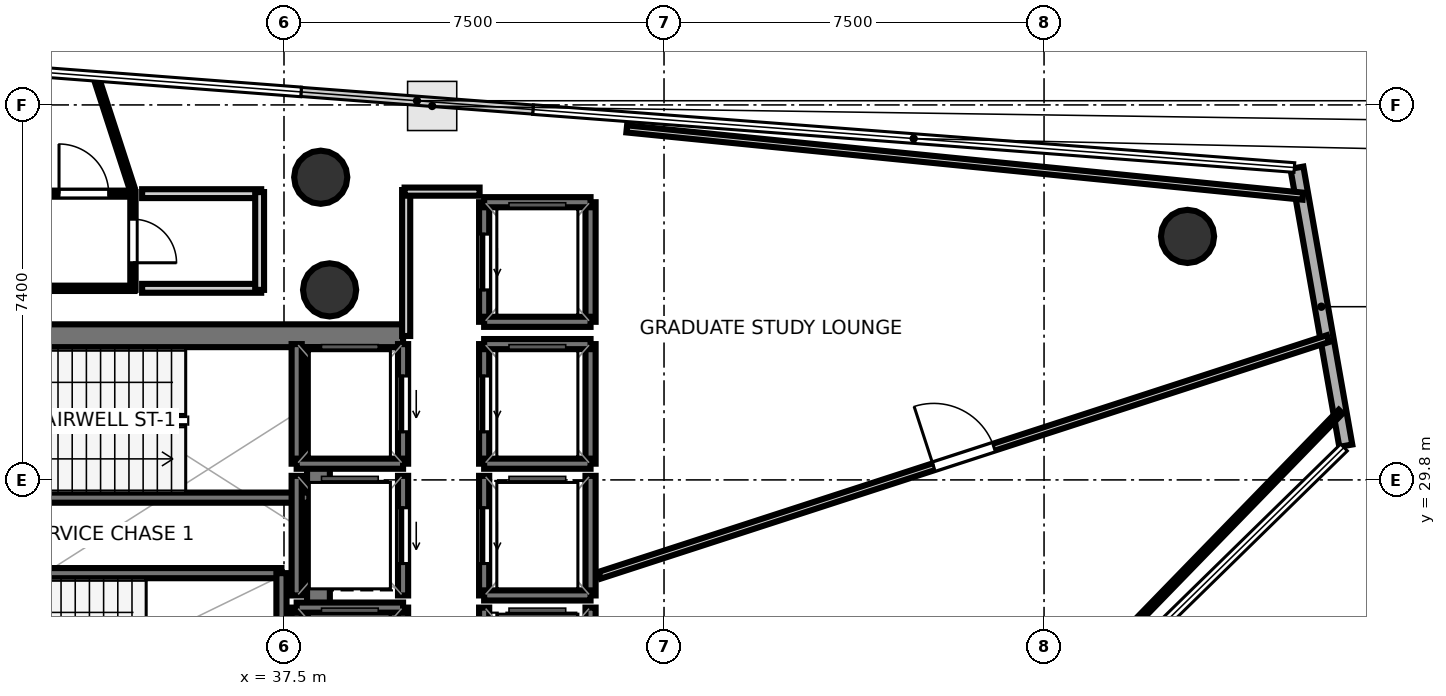
"""IFC4 building model, lengths in metres.
Left out: names, types, materials, properties, quantities, classifications, styles, units other than length and angle.
Written with IfcOpenShell. Run it as: python <this file> out.ifc"""

import sys

from ifc_helpers import new_model, si_unit, direction, frame, frame_2d, origin, origin_2d, place, context, subcontext, project, spatial, rectangle, hollow_circle, extrude, element, fill, save


model = new_model("IFC4")
c1 = context("Model", 3, precision=1e-05, world=origin(), true_north=direction((0.0, 1.0)))
c2 = subcontext(c1, "Body", "Model", "MODEL_VIEW")
j1 = project(units=[si_unit("LENGTHUNIT", "METRE"), si_unit("PLANEANGLEUNIT", "RADIAN")], contexts=[c1])
p1 = place(None, origin())
s1 = spatial("IfcSite", under=j1, at=p1, CompositionType="ELEMENT")
p2 = place(p1, origin())
s2 = spatial("IfcBuilding", under=s1, at=p2, CompositionType="ELEMENT")
p3 = place(p2, frame((0.0, 0.0, 234.5)))
s3 = spatial("IfcBuildingStorey", under=s2, at=p3, CompositionType="ELEMENT", Elevation=234.5)
p4 = place(p3, frame((29.33, 32.645, 0.0), z_axis=(0.0, 0.0, 1.0), x_axis=(1.0, 0.0, 0.0)))
e1 = element("IfcWall", 1, at=p4, inside=s3, PredefinedType="SHEAR", context=c2, shape_type="SweptSolid", body=[
    extrude(rectangle(XDim=10.52, YDim=0.45, at=frame_2d((5.26, 0.0))), origin(), (0.0, 0.0, 1.0), 4.32),
])
p5 = place(p4, frame((0.895, 0.0, 0.0)))
e2 = element("IfcOpeningElement", 2, at=p5, cuts=e1, PredefinedType="OPENING", context=c2, shape_type="SweptSolid", body=[
    extrude(rectangle(XDim=1.25, YDim=2.15, at=frame_2d((0.625, 1.075))), frame((0.0, 0.235, 0.0), z_axis=(0.0, -1.0, 0.0), x_axis=(1.0, 0.0, 0.0)), (0.0, 0.0, 1.0), 0.47),
])
p6 = place(p3, frame((38.18, 24.98, 0.0), z_axis=(0.0, 0.0, 1.0), x_axis=(0.0, 1.0, 0.0)))
e3 = element("IfcWall", 3, at=p6, inside=s3, PredefinedType="SHEAR", context=c2, shape_type="SweptSolid", body=[
    extrude(rectangle(XDim=7.44, YDim=0.45, at=frame_2d((3.72, 0.0))), origin(), (0.0, 0.0, 1.0), 4.32),
])
p7 = place(p3, frame((38.4, 33.55, 0.0), z_axis=(0.0, 0.0, 1.0), x_axis=(1.0, 0.0, 0.0)))
e4 = element("IfcColumn", 4, at=p7, inside=s3, PredefinedType="COLUMN", context=c2, shape_type="SweptSolid", body=[
    extrude(hollow_circle(Radius=0.525, WallThickness=0.028, at=origin_2d()), origin(), (0.0, 0.0, 1.0), 4.5),
])
for number, where, z_axis, x_axis in (
    (5, (55.332, 34.605, -0.27), (0.0, 0.0, 1.0), (1.0, 0.0, 0.0)),
    (6, (38.225, 35.773, -0.27), (0.0, 0.0, 1.0), (1.0, 0.0, 0.0)),
):
    element("IfcColumn", number, at=place(p3, frame(where, z_axis=z_axis, x_axis=x_axis)), inside=s3, PredefinedType="COLUMN", context=c2, shape_type="SweptSolid", body=[
        extrude(hollow_circle(Radius=0.525, WallThickness=0.028, at=origin_2d()), origin(), (0.0, 0.0, 1.0), 4.77),
    ])
p8 = place(p3, frame((58.455, 30.475, 0.0), z_axis=(0.0, 0.0, 1.0), x_axis=(-0.173235165229, 0.984880488957, 0.0)))
e7 = element("IfcWall", 7, at=p8, inside=s3, PredefinedType="SOLIDWALL", context=c2, shape_type="SweptSolid", body=[
    extrude(rectangle(XDim=5.57, YDim=0.26, at=frame_2d((2.785, 0.0))), origin(), (0.0, 0.0, 1.0), 4.32),
])
p9 = place(p3, frame((29.7, 29.45, 0.0), z_axis=(0.0, 0.0, 1.0), x_axis=(1.0, 0.0, 0.0)))
e8 = element("IfcWall", 8, at=p9, inside=s3, PredefinedType="SOLIDWALL", context=c2, shape_type="SweptSolid", body=[
    extrude(rectangle(XDim=8.3, YDim=0.2, at=frame_2d((4.15, 0.0))), origin(), (0.0, 0.0, 1.0), 4.32),
])
p10 = place(p3, frame((29.7, 27.96, 0.0), z_axis=(0.0, 0.0, 1.0), x_axis=(1.0, 0.0, 0.0)))
e9 = element("IfcWall", 9, at=p10, inside=s3, PredefinedType="SOLIDWALL", context=c2, shape_type="SweptSolid", body=[
    extrude(rectangle(XDim=7.75, YDim=0.2, at=frame_2d((3.875, 0.0))), origin(), (0.0, 0.0, 1.0), 4.32),
])
p11 = place(p3, frame((37.45, 24.9, 0.0), z_axis=(0.0, 0.0, 1.0), x_axis=(0.0, 1.0, 0.0)))
e10 = element("IfcWall", 10, at=p11, inside=s3, PredefinedType="SOLIDWALL", context=c2, shape_type="SweptSolid", body=[
    extrude(rectangle(XDim=3.06, YDim=0.2, at=frame_2d((1.53, 0.0))), origin(), (0.0, 0.0, 1.0), 4.32),
])
p12 = place(p3, frame((39.85, 30.12, 0.0), z_axis=(0.0, 0.0, 1.0), x_axis=(0.0, 1.0, 0.0)))
e11 = element("IfcWall", 11, at=p12, inside=s3, PredefinedType="SOLIDWALL", context=c2, shape_type="SweptSolid", body=[
    extrude(rectangle(XDim=2.36, YDim=0.2, at=frame_2d((1.18, 0.0))), origin(), (0.0, 0.0, 1.0), 4.32),
])
p13 = place(p12, frame((0.63, 0.0, 0.0)))
e12 = element("IfcOpeningElement", 12, at=p13, cuts=e11, PredefinedType="OPENING", context=c2, shape_type="SweptSolid", body=[
    extrude(rectangle(XDim=1.1, YDim=2.15, at=frame_2d((0.55, 1.075))), frame((0.0, 0.11, 0.0), z_axis=(0.0, -1.0, 0.0), x_axis=(1.0, 0.0, 0.0)), (0.0, 0.0, 1.0), 0.22),
])
p14 = place(p3, frame((37.75, 30.12, 0.0), z_axis=(0.0, 0.0, 1.0), x_axis=(0.0, 1.0, 0.0)))
e13 = element("IfcWall", 13, at=p14, inside=s3, PredefinedType="SOLIDWALL", context=c2, shape_type="SweptSolid", body=[
    extrude(rectangle(XDim=2.36, YDim=0.2, at=frame_2d((1.18, 0.0))), origin(), (0.0, 0.0, 1.0), 4.32),
])
p15 = place(p3, frame((37.75, 30.12, 0.0), z_axis=(0.0, 0.0, 1.0), x_axis=(1.0, 0.0, 0.0)))
e14 = element("IfcWall", 14, at=p15, inside=s3, PredefinedType="SOLIDWALL", context=c2, shape_type="SweptSolid", body=[
    extrude(rectangle(XDim=2.1, YDim=0.2, at=frame_2d((1.05, 0.0))), origin(), (0.0, 0.0, 1.0), 4.32),
])
p16 = place(p3, frame((39.85, 24.92, 0.0), z_axis=(0.0, 0.0, 1.0), x_axis=(0.0, 1.0, 0.0)))
e15 = element("IfcWall", 15, at=p16, inside=s3, PredefinedType="SOLIDWALL", context=c2, shape_type="SweptSolid", body=[
    extrude(rectangle(XDim=2.36, YDim=0.2, at=frame_2d((1.18, 0.0))), origin(), (0.0, 0.0, 1.0), 4.32),
])
p17 = place(p16, frame((0.63, 0.0, 0.0)))
e16 = element("IfcOpeningElement", 16, at=p17, cuts=e15, PredefinedType="OPENING", context=c2, shape_type="SweptSolid", body=[
    extrude(rectangle(XDim=1.1, YDim=2.15, at=frame_2d((0.55, 1.075))), frame((0.0, 0.11, 0.0), z_axis=(0.0, -1.0, 0.0), x_axis=(1.0, 0.0, 0.0)), (0.0, 0.0, 1.0), 0.22),
])
p18 = place(p3, frame((37.75, 24.92, 0.0), z_axis=(0.0, 0.0, 1.0), x_axis=(0.0, 1.0, 0.0)))
e17 = element("IfcWall", 17, at=p18, inside=s3, PredefinedType="SOLIDWALL", context=c2, shape_type="SweptSolid", body=[
    extrude(rectangle(XDim=2.36, YDim=0.2, at=frame_2d((1.18, 0.0))), origin(), (0.0, 0.0, 1.0), 4.32),
])
p19 = place(p3, frame((37.75, 27.28, 0.0), z_axis=(0.0, 0.0, 1.0), x_axis=(1.0, 0.0, 0.0)))
e18 = element("IfcWall", 18, at=p19, inside=s3, PredefinedType="SOLIDWALL", context=c2, shape_type="SweptSolid", body=[
    extrude(rectangle(XDim=2.1, YDim=0.2, at=frame_2d((1.05, 0.0))), origin(), (0.0, 0.0, 1.0), 4.32),
])
p20 = place(p3, frame((43.55, 30.12, 0.0), z_axis=(0.0, 0.0, 1.0), x_axis=(0.0, 1.0, 0.0)))
e19 = element("IfcWall", 19, at=p20, inside=s3, PredefinedType="SOLIDWALL", context=c2, shape_type="SweptSolid", body=[
    extrude(rectangle(XDim=2.36, YDim=0.2, at=frame_2d((1.18, 0.0))), origin(), (0.0, 0.0, 1.0), 4.32),
])
p21 = place(p3, frame((41.45, 30.12, 0.0), z_axis=(0.0, 0.0, 1.0), x_axis=(0.0, 1.0, 0.0)))
e20 = element("IfcWall", 20, at=p21, inside=s3, PredefinedType="SOLIDWALL", context=c2, shape_type="SweptSolid", body=[
    extrude(rectangle(XDim=2.36, YDim=0.2, at=frame_2d((1.18, 0.0))), origin(), (0.0, 0.0, 1.0), 4.32),
])
p22 = place(p21, frame((0.63, 0.0, 0.0)))
e21 = element("IfcOpeningElement", 21, at=p22, cuts=e20, PredefinedType="OPENING", context=c2, shape_type="SweptSolid", body=[
    extrude(rectangle(XDim=1.1, YDim=2.15, at=frame_2d((0.55, 1.075))), frame((0.0, 0.11, 0.0), z_axis=(0.0, -1.0, 0.0), x_axis=(1.0, 0.0, 0.0)), (0.0, 0.0, 1.0), 0.22),
])
for number, where, z_axis, x_axis in (
    (22, (41.45, 32.48, 0.0), (0.0, 0.0, 1.0), (1.0, 0.0, 0.0)),
    (23, (41.45, 30.12, 0.0), (0.0, 0.0, 1.0), (1.0, 0.0, 0.0)),
):
    element("IfcWall", number, at=place(p3, frame(where, z_axis=z_axis, x_axis=x_axis)), inside=s3, PredefinedType="SOLIDWALL", context=c2, shape_type="SweptSolid", body=[
        extrude(rectangle(XDim=2.1, YDim=0.2, at=frame_2d((1.05, 0.0))), origin(), (0.0, 0.0, 1.0), 4.32),
    ])
p23 = place(p3, frame((43.55, 27.52, 0.0), z_axis=(0.0, 0.0, 1.0), x_axis=(0.0, 1.0, 0.0)))
e24 = element("IfcWall", 24, at=p23, inside=s3, PredefinedType="SOLIDWALL", context=c2, shape_type="SweptSolid", body=[
    extrude(rectangle(XDim=2.36, YDim=0.2, at=frame_2d((1.18, 0.0))), origin(), (0.0, 0.0, 1.0), 4.32),
])
p24 = place(p3, frame((41.45, 27.52, 0.0), z_axis=(0.0, 0.0, 1.0), x_axis=(0.0, 1.0, 0.0)))
e25 = element("IfcWall", 25, at=p24, inside=s3, PredefinedType="SOLIDWALL", context=c2, shape_type="SweptSolid", body=[
    extrude(rectangle(XDim=2.36, YDim=0.2, at=frame_2d((1.18, 0.0))), origin(), (0.0, 0.0, 1.0), 4.32),
])
p25 = place(p24, frame((0.63, 0.0, 0.0)))
e26 = element("IfcOpeningElement", 26, at=p25, cuts=e25, PredefinedType="OPENING", context=c2, shape_type="SweptSolid", body=[
    extrude(rectangle(XDim=1.1, YDim=2.15, at=frame_2d((0.55, 1.075))), frame((0.0, 0.11, 0.0), z_axis=(0.0, -1.0, 0.0), x_axis=(1.0, 0.0, 0.0)), (0.0, 0.0, 1.0), 0.22),
])
p26 = place(p3, frame((41.45, 27.52, 0.0), z_axis=(0.0, 0.0, 1.0), x_axis=(1.0, 0.0, 0.0)))
e27 = element("IfcWall", 27, at=p26, inside=s3, PredefinedType="SOLIDWALL", context=c2, shape_type="SweptSolid", body=[
    extrude(rectangle(XDim=2.1, YDim=0.2, at=frame_2d((1.05, 0.0))), origin(), (0.0, 0.0, 1.0), 4.32),
])
p27 = place(p3, frame((43.55, 24.92, 0.0), z_axis=(0.0, 0.0, 1.0), x_axis=(0.0, 1.0, 0.0)))
e28 = element("IfcWall", 28, at=p27, inside=s3, PredefinedType="SOLIDWALL", context=c2, shape_type="SweptSolid", body=[
    extrude(rectangle(XDim=2.36, YDim=0.2, at=frame_2d((1.18, 0.0))), origin(), (0.0, 0.0, 1.0), 4.32),
])
p28 = place(p3, frame((41.45, 24.92, 0.0), z_axis=(0.0, 0.0, 1.0), x_axis=(0.0, 1.0, 0.0)))
e29 = element("IfcWall", 29, at=p28, inside=s3, PredefinedType="SOLIDWALL", context=c2, shape_type="SweptSolid", body=[
    extrude(rectangle(XDim=2.36, YDim=0.2, at=frame_2d((1.18, 0.0))), origin(), (0.0, 0.0, 1.0), 4.32),
])
p29 = place(p28, frame((0.63, 0.0, 0.0)))
e30 = element("IfcOpeningElement", 30, at=p29, cuts=e29, PredefinedType="OPENING", context=c2, shape_type="SweptSolid", body=[
    extrude(rectangle(XDim=1.1, YDim=2.15, at=frame_2d((0.55, 1.075))), frame((0.0, 0.11, 0.0), z_axis=(0.0, -1.0, 0.0), x_axis=(1.0, 0.0, 0.0)), (0.0, 0.0, 1.0), 0.22),
])
p30 = place(p3, frame((39.85, 27.52, 0.0), z_axis=(0.0, 0.0, 1.0), x_axis=(0.0, 1.0, 0.0)))
e31 = element("IfcWall", 31, at=p30, inside=s3, PredefinedType="SOLIDWALL", context=c2, shape_type="SweptSolid", body=[
    extrude(rectangle(XDim=2.36, YDim=0.2, at=frame_2d((1.18, 0.0))), origin(), (0.0, 0.0, 1.0), 4.32),
])
p31 = place(p30, frame((0.63, 0.0, 0.0)))
e32 = element("IfcOpeningElement", 32, at=p31, cuts=e31, PredefinedType="OPENING", context=c2, shape_type="SweptSolid", body=[
    extrude(rectangle(XDim=1.1, YDim=2.15, at=frame_2d((0.55, 1.075))), frame((0.0, 0.11, 0.0), z_axis=(0.0, -1.0, 0.0), x_axis=(1.0, 0.0, 0.0)), (0.0, 0.0, 1.0), 0.22),
])
p32 = place(p3, frame((37.75, 27.52, 0.0), z_axis=(0.0, 0.0, 1.0), x_axis=(0.0, 1.0, 0.0)))
e33 = element("IfcWall", 33, at=p32, inside=s3, PredefinedType="SOLIDWALL", context=c2, shape_type="SweptSolid", body=[
    extrude(rectangle(XDim=2.36, YDim=0.2, at=frame_2d((1.18, 0.0))), origin(), (0.0, 0.0, 1.0), 4.32),
])
p33 = place(p3, frame((43.55, 32.92, 0.0), z_axis=(0.0, 0.0, 1.0), x_axis=(0.0, 1.0, 0.0)))
e34 = element("IfcWall", 34, at=p33, inside=s3, PredefinedType="SOLIDWALL", context=c2, shape_type="SweptSolid", body=[
    extrude(rectangle(XDim=2.36, YDim=0.2, at=frame_2d((1.18, 0.0))), origin(), (0.0, 0.0, 1.0), 4.32),
])
p34 = place(p3, frame((41.45, 32.92, 0.0), z_axis=(0.0, 0.0, 1.0), x_axis=(0.0, 1.0, 0.0)))
e35 = element("IfcWall", 35, at=p34, inside=s3, PredefinedType="SOLIDWALL", context=c2, shape_type="SweptSolid", body=[
    extrude(rectangle(XDim=2.36, YDim=0.2, at=frame_2d((1.18, 0.0))), origin(), (0.0, 0.0, 1.0), 4.32),
])
p35 = place(p34, frame((0.63, 0.0, 0.0)))
e36 = element("IfcOpeningElement", 36, at=p35, cuts=e35, PredefinedType="OPENING", context=c2, shape_type="SweptSolid", body=[
    extrude(rectangle(XDim=1.1, YDim=2.15, at=frame_2d((0.55, 1.075))), frame((0.0, 0.11, 0.0), z_axis=(0.0, -1.0, 0.0), x_axis=(1.0, 0.0, 0.0)), (0.0, 0.0, 1.0), 0.22),
])
for number, where, z_axis, x_axis in (
    (37, (41.45, 35.28, 0.0), (0.0, 0.0, 1.0), (1.0, 0.0, 0.0)),
    (38, (41.45, 32.92, 0.0), (0.0, 0.0, 1.0), (1.0, 0.0, 0.0)),
):
    element("IfcWall", number, at=place(p3, frame(where, z_axis=z_axis, x_axis=x_axis)), inside=s3, PredefinedType="SOLIDWALL", context=c2, shape_type="SweptSolid", body=[
        extrude(rectangle(XDim=2.1, YDim=0.2, at=frame_2d((1.05, 0.0))), origin(), (0.0, 0.0, 1.0), 4.32),
    ])
p36 = place(p3, frame((39.911, 32.64, 0.0), z_axis=(0.0, 0.0, 1.0), x_axis=(0.0, 1.0, 0.0)))
e39 = element("IfcWall", 39, at=p36, inside=s3, PredefinedType="PARTITIONING", context=c2, shape_type="SweptSolid", body=[
    extrude(rectangle(XDim=2.88, YDim=0.16, at=frame_2d((1.44, 0.0))), origin(), (0.0, 0.0, 1.0), 3.64),
])
p37 = place(p3, frame((39.88, 35.489, 0.0), z_axis=(0.0, 0.0, 1.0), x_axis=(1.0, 0.0, 0.0)))
e40 = element("IfcWall", 40, at=p37, inside=s3, PredefinedType="PARTITIONING", context=c2, shape_type="SweptSolid", body=[
    extrude(rectangle(XDim=1.48, YDim=0.16, at=frame_2d((0.74, 0.0))), origin(), (0.0, 0.0, 1.0), 3.64),
])
p38 = place(p3, frame((34.55, 33.581, 0.0), z_axis=(0.0, 0.0, 1.0), x_axis=(-1.0, 0.0, 0.0)))
e41 = element("IfcWall", 41, at=p38, inside=s3, PredefinedType="PARTITIONING", context=c2, shape_type="SweptSolid", body=[
    extrude(rectangle(XDim=2.0, YDim=0.105, at=frame_2d((1.0, 0.0))), origin(), (0.0, 0.0, 1.0), 3.64),
])
p39 = place(p3, frame((32.55, 35.449, 0.0), z_axis=(0.0, 0.0, 1.0), x_axis=(1.0, 0.0, 0.0)))
e42 = element("IfcWall", 42, at=p39, inside=s3, PredefinedType="PARTITIONING", context=c2, shape_type="SweptSolid", body=[
    extrude(rectangle(XDim=2.0, YDim=0.12, at=frame_2d((1.0, 0.0))), origin(), (0.0, 0.0, 1.0), 3.64),
])
p40 = place(p39, frame((0.51, 0.0, 0.0)))
e43 = element("IfcOpeningElement", 43, at=p40, cuts=e42, PredefinedType="OPENING", context=c2, shape_type="SweptSolid", body=[
    extrude(rectangle(XDim=0.98, YDim=2.1, at=frame_2d((0.49, 1.05))), frame((0.0, 0.07, 0.0), z_axis=(0.0, -1.0, 0.0), x_axis=(1.0, 0.0, 0.0)), (0.0, 0.0, 1.0), 0.14),
])
p41 = place(p3, frame((34.519, 35.48, 0.0), z_axis=(0.0, 0.0, 1.0), x_axis=(0.0, -1.0, 0.0)))
e44 = element("IfcWall", 44, at=p41, inside=s3, PredefinedType="PARTITIONING", context=c2, shape_type="SweptSolid", body=[
    extrude(rectangle(XDim=1.93, YDim=0.105, at=frame_2d((0.965, 0.0))), origin(), (0.0, 0.0, 1.0), 3.64),
])
p42 = place(p41, frame((0.535, 0.0, 0.0)))
e45 = element("IfcOpeningElement", 45, at=p42, cuts=e44, PredefinedType="OPENING", context=c2, shape_type="SweptSolid", body=[
    extrude(rectangle(XDim=0.86, YDim=2.05, at=frame_2d((0.43, 1.025))), frame((0.0, 0.062, 0.0), z_axis=(0.0, -1.0, 0.0), x_axis=(1.0, 0.0, 0.0)), (0.0, 0.0, 1.0), 0.125),
])
for number, where, z_axis, x_axis in (
    (46, (37.05, 33.581, 0.0), (0.0, 0.0, 1.0), (-1.0, 0.0, 0.0)),
    (47, (34.7, 35.449, 0.0), (0.0, 0.0, 1.0), (1.0, 0.0, 0.0)),
):
    element("IfcWall", number, at=place(p3, frame(where, z_axis=z_axis, x_axis=x_axis)), inside=s3, PredefinedType="PLUMBINGWALL", context=c2, shape_type="SweptSolid", body=[
        extrude(rectangle(XDim=2.35, YDim=0.175, at=frame_2d((1.175, 0.0))), origin(), (0.0, 0.0, 1.0), 3.64),
    ])
p43 = place(p3, frame((37.019, 35.48, 0.0), z_axis=(0.0, 0.0, 1.0), x_axis=(0.0, -1.0, 0.0)))
e48 = element("IfcWall", 48, at=p43, inside=s3, PredefinedType="PLUMBINGWALL", context=c2, shape_type="SweptSolid", body=[
    extrude(rectangle(XDim=1.93, YDim=0.175, at=frame_2d((0.965, 0.0))), origin(), (0.0, 0.0, 1.0), 3.64),
])
p44 = place(p3, frame((43.729, 27.918, 0.0), z_axis=(0.0, 0.0, 1.0), x_axis=(0.951056383536, 0.309017402966, 0.0)))
e49 = element("IfcWall", 49, at=p44, inside=s3, PredefinedType="PARTITIONING", context=c2, shape_type="SweptSolid", body=[
    extrude(rectangle(XDim=15.114, YDim=0.14, at=frame_2d((7.557, 0.0))), origin(), (0.0, 0.0, 1.0), 3.64),
])
p45 = place(p44, frame((6.932, 0.0, 0.0)))
e50 = element("IfcOpeningElement", 50, at=p45, cuts=e49, PredefinedType="OPENING", context=c2, shape_type="SweptSolid", body=[
    extrude(rectangle(XDim=1.25, YDim=2.2, at=frame_2d((0.625, 1.1))), frame((0.0, 0.08, 0.0), z_axis=(0.0, -1.0, 0.0), x_axis=(1.0, 0.0, 0.0)), (0.0, 0.0, 1.0), 0.16),
])
p46 = place(p3, frame((58.354, 31.147, 0.0), z_axis=(0.0, 0.0, 1.0), x_axis=(-0.696869785683, -0.717197672753, 0.0)))
e51 = element("IfcWall", 51, at=p46, inside=s3, PredefinedType="PARTITIONING", context=c2, shape_type="SweptSolid", body=[
    extrude(rectangle(XDim=12.118, YDim=0.105, at=frame_2d((6.059, 0.0))), origin(), (0.0, 0.0, 1.0), 3.64),
])
p47 = place(p3, frame((34.497, 35.57, 0.0), z_axis=(0.0, 0.0, 1.0), x_axis=(-0.308984127741, 0.951067194684, 0.0)))
e52 = element("IfcWall", 52, at=p47, inside=s3, PredefinedType="PARTITIONING", context=c2, shape_type="SweptSolid", body=[
    extrude(rectangle(XDim=2.329, YDim=0.105, at=frame_2d((1.164, 0.0))), origin(), (0.0, 0.0, 1.0), 3.64),
])
p48 = place(p3, frame((44.264, 36.727, 0.0), z_axis=(0.0, 0.0, 1.0), x_axis=(0.995085738049, -0.099017038589, 0.0)))
e53 = element("IfcWall", 53, at=p48, inside=s3, PredefinedType="PARTITIONING", context=c2, shape_type="SweptSolid", body=[
    extrude(rectangle(XDim=13.411, YDim=0.14, at=frame_2d((6.705, 0.0))), origin(), (0.0, 0.0, 1.0), 3.64),
])
p49 = place(p13, origin())
e54 = element("IfcDoor", 54, at=p49, inside=s3, OperationType="SLIDING_TO_LEFT", PredefinedType="DOOR", context=c2, shape_type="SweptSolid", body=[
    extrude(rectangle(XDim=1.1, YDim=2.15, at=frame_2d((0.55, 1.075))), frame((0.0, 0.025, 0.0), z_axis=(0.0, -1.0, 0.0), x_axis=(1.0, 0.0, 0.0)), (0.0, 0.0, 1.0), 0.05),
])
fill(e12, e54)
p50 = place(p22, origin())
e55 = element("IfcDoor", 55, at=p50, inside=s3, OperationType="SLIDING_TO_LEFT", PredefinedType="DOOR", context=c2, shape_type="SweptSolid", body=[
    extrude(rectangle(XDim=1.1, YDim=2.15, at=frame_2d((0.55, 1.075))), frame((0.0, 0.025, 0.0), z_axis=(0.0, -1.0, 0.0), x_axis=(1.0, 0.0, 0.0)), (0.0, 0.0, 1.0), 0.05),
])
fill(e21, e55)
p51 = place(p25, origin())
e56 = element("IfcDoor", 56, at=p51, inside=s3, OperationType="SLIDING_TO_LEFT", PredefinedType="DOOR", context=c2, shape_type="SweptSolid", body=[
    extrude(rectangle(XDim=1.1, YDim=2.15, at=frame_2d((0.55, 1.075))), frame((0.0, 0.025, 0.0), z_axis=(0.0, -1.0, 0.0), x_axis=(1.0, 0.0, 0.0)), (0.0, 0.0, 1.0), 0.05),
])
fill(e26, e56)
p52 = place(p31, origin())
e57 = element("IfcDoor", 57, at=p52, inside=s3, OperationType="SLIDING_TO_LEFT", PredefinedType="DOOR", context=c2, shape_type="SweptSolid", body=[
    extrude(rectangle(XDim=1.1, YDim=2.15, at=frame_2d((0.55, 1.075))), frame((0.0, 0.025, 0.0), z_axis=(0.0, -1.0, 0.0), x_axis=(1.0, 0.0, 0.0)), (0.0, 0.0, 1.0), 0.05),
])
fill(e32, e57)
p53 = place(p35, origin())
e58 = element("IfcDoor", 58, at=p53, inside=s3, OperationType="SLIDING_TO_LEFT", PredefinedType="DOOR", context=c2, shape_type="SweptSolid", body=[
    extrude(rectangle(XDim=1.1, YDim=2.15, at=frame_2d((0.55, 1.075))), frame((0.0, 0.025, 0.0), z_axis=(0.0, -1.0, 0.0), x_axis=(1.0, 0.0, 0.0)), (0.0, 0.0, 1.0), 0.05),
])
fill(e36, e58)
p54 = place(p45, origin())
e59 = element("IfcDoor", 59, at=p54, inside=s3, OperationType="SINGLE_SWING_LEFT", PredefinedType="DOOR", context=c2, shape_type="SweptSolid", body=[
    extrude(rectangle(XDim=1.25, YDim=2.2, at=frame_2d((0.625, 1.1))), frame((0.0, 0.025, 0.0), z_axis=(0.0, -1.0, 0.0), x_axis=(1.0, 0.0, 0.0)), (0.0, 0.0, 1.0), 0.05),
])
fill(e50, e59)
p55 = place(p40, origin())
e60 = element("IfcDoor", 60, at=p55, inside=s3, OperationType="SINGLE_SWING_LEFT", PredefinedType="DOOR", context=c2, shape_type="SweptSolid", body=[
    extrude(rectangle(XDim=0.98, YDim=2.1, at=frame_2d((0.49, 1.05))), frame((0.0, 0.025, 0.0), z_axis=(0.0, -1.0, 0.0), x_axis=(1.0, 0.0, 0.0)), (0.0, 0.0, 1.0), 0.05),
])
fill(e43, e60)
p56 = place(p42, origin())
e61 = element("IfcDoor", 61, at=p56, inside=s3, OperationType="SINGLE_SWING_RIGHT", PredefinedType="DOOR", context=c2, shape_type="SweptSolid", body=[
    extrude(rectangle(XDim=0.86, YDim=2.05, at=frame_2d((0.43, 1.025))), frame((0.0, 0.025, 0.0), z_axis=(0.0, -1.0, 0.0), x_axis=(1.0, 0.0, 0.0)), (0.0, 0.0, 1.0), 0.05),
])
fill(e45, e61)
save(model, sys.argv[1])
